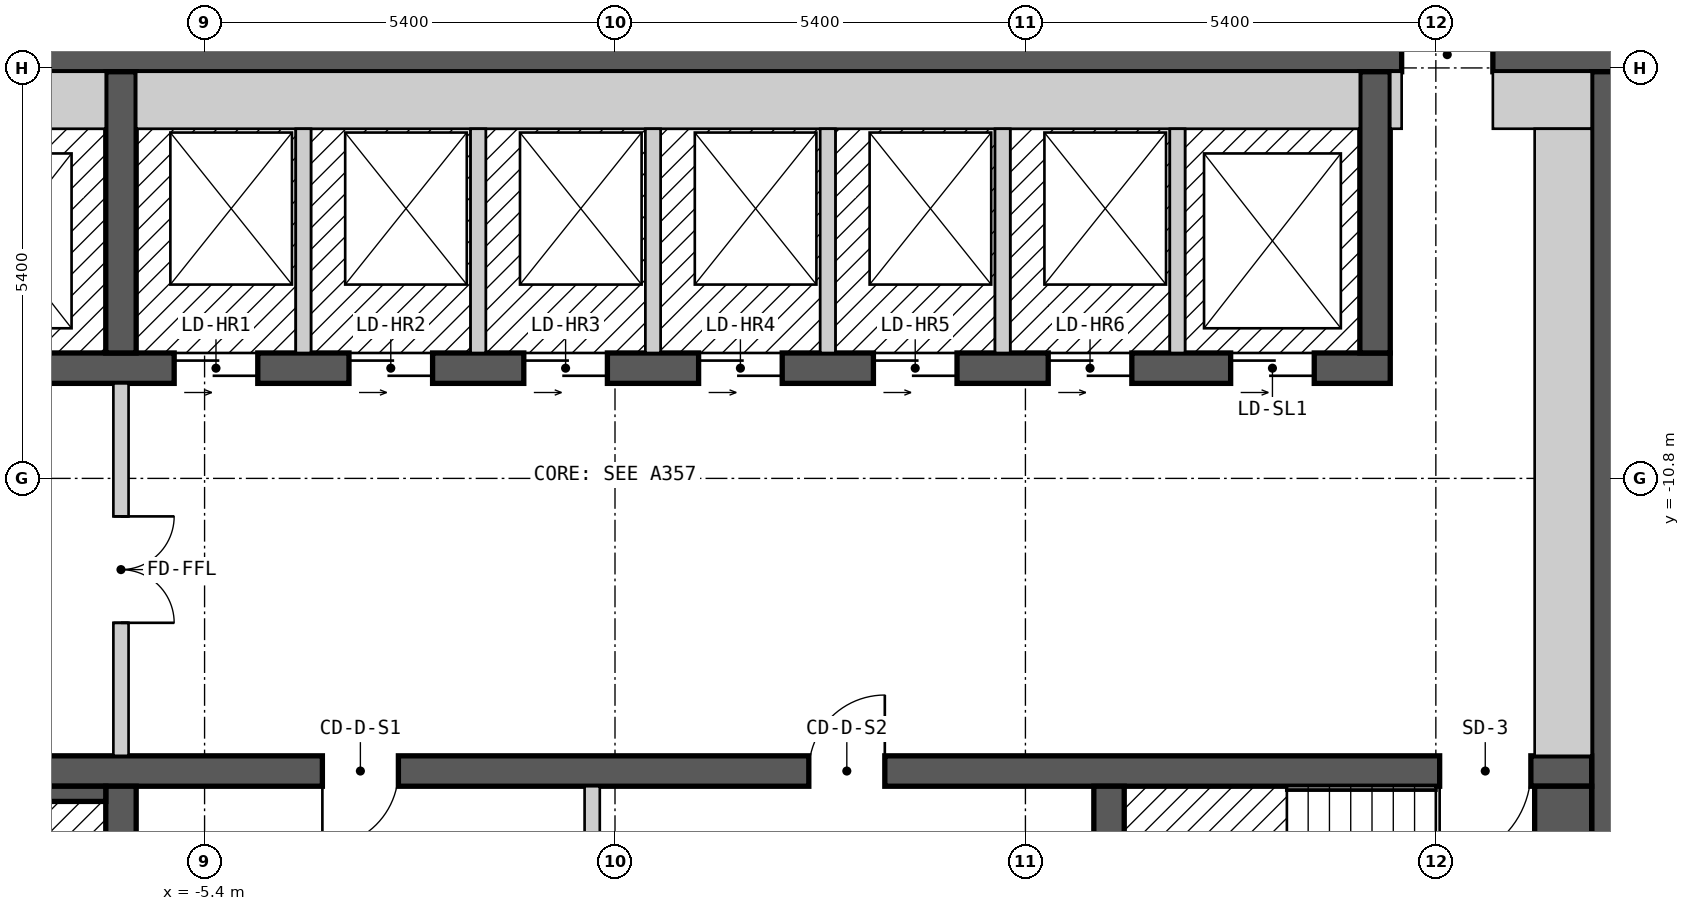
"""IFC4 building model, lengths in metres.
Left out: names, types, materials, properties, quantities, classifications, styles, units other than length and angle.
Written with IfcOpenShell. Run it as: python <this file> out.ifc"""

import sys

from ifc_helpers import new_model, si_unit, direction, frame, frame_2d, origin, place, context, subcontext, project, spatial, rectangle, extrude, element, fill, save


model = new_model("IFC4")
c1 = context("Model", 3, precision=1e-05, world=origin(), true_north=direction((0.0, 1.0)))
c2 = subcontext(c1, "Body", "Model", "MODEL_VIEW")
j1 = project(units=[si_unit("LENGTHUNIT", "METRE"), si_unit("PLANEANGLEUNIT", "RADIAN")], contexts=[c1])
p1 = place(None, origin())
s1 = spatial("IfcSite", under=j1, at=p1, CompositionType="ELEMENT")
p2 = place(p1, origin())
s2 = spatial("IfcBuilding", under=s1, at=p2, CompositionType="ELEMENT")
p3 = place(p2, frame((0.0, 0.0, 208.8)))
s3 = spatial("IfcBuildingStorey", under=s2, at=p3, CompositionType="ELEMENT", Elevation=208.8)
p4 = place(p3, frame((-13.3, -5.225, 0.0), z_axis=(0.0, 0.0, 1.0), x_axis=(1.0, 0.0, 0.0)))
e1 = element("IfcWall", 1, at=p4, inside=s3, PredefinedType="SHEAR", context=c2, shape_type="SweptSolid", body=[
    extrude(rectangle(XDim=26.6, YDim=0.45, at=frame_2d((13.3, 0.0))), origin(), (0.0, 0.0, 1.0), 2.7),
])
p5 = place(p4, frame((23.65, 0.0, 0.0)))
e2 = element("IfcOpeningElement", 2, at=p5, cuts=e1, PredefinedType="OPENING", context=c2, shape_type="SweptSolid", body=[
    extrude(rectangle(XDim=1.2, YDim=2.1, at=frame_2d((0.6, 1.05))), frame((0.0, 0.235, 0.0), z_axis=(0.0, -1.0, 0.0), x_axis=(1.0, 0.0, 0.0)), (0.0, 0.0, 1.0), 0.47),
])
p6 = place(p3, frame((13.075, -18.55, 0.0), z_axis=(0.0, 0.0, 1.0), x_axis=(0.0, 1.0, 0.0)))
e3 = element("IfcWall", 3, at=p6, inside=s3, PredefinedType="SHEAR", context=c2, shape_type="SweptSolid", body=[
    extrude(rectangle(XDim=13.1, YDim=0.45, at=frame_2d((6.55, 0.0))), origin(), (0.0, 0.0, 1.0), 2.7),
])
p7 = place(p3, frame((-12.85, -14.65, 0.0), z_axis=(0.0, 0.0, 1.0), x_axis=(1.0, 0.0, 0.0)))
e4 = element("IfcWall", 4, at=p7, inside=s3, PredefinedType="SHEAR", context=c2, shape_type="SweptSolid", body=[
    extrude(rectangle(XDim=25.7, YDim=0.4, at=frame_2d((12.85, 0.0))), origin(), (0.0, 0.0, 1.0), 2.7),
])
p8 = place(p7, frame((2.05, 0.0, 0.0), z_axis=(0.0, 0.0, 1.0), x_axis=(-1.0, 0.0, 0.0)))
e5 = element("IfcOpeningElement", 5, at=p8, cuts=e4, PredefinedType="OPENING", context=c2, shape_type="SweptSolid", body=[
    extrude(rectangle(XDim=1.2, YDim=2.1, at=frame_2d((0.6, 1.05))), frame((0.0, 0.21, 0.0), z_axis=(0.0, -1.0, 0.0), x_axis=(1.0, 0.0, 0.0)), (0.0, 0.0, 1.0), 0.42),
])
p9 = place(p7, frame((24.9, 0.0, 0.0), z_axis=(0.0, 0.0, 1.0), x_axis=(-1.0, 0.0, 0.0)))
e6 = element("IfcOpeningElement", 6, at=p9, cuts=e4, PredefinedType="OPENING", context=c2, shape_type="SweptSolid", body=[
    extrude(rectangle(XDim=1.2, YDim=2.1, at=frame_2d((0.6, 1.05))), frame((0.0, 0.21, 0.0), z_axis=(0.0, -1.0, 0.0), x_axis=(1.0, 0.0, 0.0)), (0.0, 0.0, 1.0), 0.42),
])
p10 = place(p7, frame((10.0, 0.0, 0.0), z_axis=(0.0, 0.0, 1.0), x_axis=(-1.0, 0.0, 0.0)))
e7 = element("IfcOpeningElement", 7, at=p10, cuts=e4, PredefinedType="OPENING", context=c2, shape_type="SweptSolid", body=[
    extrude(rectangle(XDim=1.0, YDim=2.1, at=frame_2d((0.5, 1.05))), frame((0.0, 0.21, 0.0), z_axis=(0.0, -1.0, 0.0), x_axis=(1.0, 0.0, 0.0)), (0.0, 0.0, 1.0), 0.42),
])
p11 = place(p7, frame((16.4, 0.0, 0.0), z_axis=(0.0, 0.0, 1.0), x_axis=(-1.0, 0.0, 0.0)))
e8 = element("IfcOpeningElement", 8, at=p11, cuts=e4, PredefinedType="OPENING", context=c2, shape_type="SweptSolid", body=[
    extrude(rectangle(XDim=1.0, YDim=2.1, at=frame_2d((0.5, 1.05))), frame((0.0, 0.21, 0.0), z_axis=(0.0, -1.0, 0.0), x_axis=(1.0, 0.0, 0.0)), (0.0, 0.0, 1.0), 0.42),
])
p12 = place(p3, frame((-12.85, -9.35, 0.0), z_axis=(0.0, 0.0, 1.0), x_axis=(1.0, 0.0, 0.0)))
e9 = element("IfcWall", 9, at=p12, inside=s3, PredefinedType="SHEAR", context=c2, shape_type="SweptSolid", body=[
    extrude(rectangle(XDim=23.05, YDim=0.4, at=frame_2d((11.525, 0.0))), origin(), (0.0, 0.0, 1.0), 2.7),
])
p13 = place(p12, frame((1.45, 0.0, 0.0)))
e10 = element("IfcOpeningElement", 10, at=p13, cuts=e9, PredefinedType="OPENING", context=c2, shape_type="SweptSolid", body=[
    extrude(rectangle(XDim=1.1, YDim=2.1, at=frame_2d((0.55, 1.05))), frame((0.0, 0.21, 0.0), z_axis=(0.0, -1.0, 0.0), x_axis=(1.0, 0.0, 0.0)), (0.0, 0.0, 1.0), 0.42),
])
p14 = place(p12, frame((4.25, 0.0, 0.0)))
e11 = element("IfcOpeningElement", 11, at=p14, cuts=e9, PredefinedType="OPENING", context=c2, shape_type="SweptSolid", body=[
    extrude(rectangle(XDim=1.1, YDim=2.1, at=frame_2d((0.55, 1.05))), frame((0.0, 0.21, 0.0), z_axis=(0.0, -1.0, 0.0), x_axis=(1.0, 0.0, 0.0)), (0.0, 0.0, 1.0), 0.42),
])
p15 = place(p12, frame((7.05, 0.0, 0.0)))
e12 = element("IfcOpeningElement", 12, at=p15, cuts=e9, PredefinedType="OPENING", context=c2, shape_type="SweptSolid", body=[
    extrude(rectangle(XDim=1.1, YDim=2.1, at=frame_2d((0.55, 1.05))), frame((0.0, 0.21, 0.0), z_axis=(0.0, -1.0, 0.0), x_axis=(1.0, 0.0, 0.0)), (0.0, 0.0, 1.0), 0.42),
])
p16 = place(p12, frame((9.35, 0.0, 0.0)))
e13 = element("IfcOpeningElement", 13, at=p16, cuts=e9, PredefinedType="OPENING", context=c2, shape_type="SweptSolid", body=[
    extrude(rectangle(XDim=1.1, YDim=2.1, at=frame_2d((0.55, 1.05))), frame((0.0, 0.21, 0.0), z_axis=(0.0, -1.0, 0.0), x_axis=(1.0, 0.0, 0.0)), (0.0, 0.0, 1.0), 0.42),
])
p17 = place(p12, frame((11.65, 0.0, 0.0)))
e14 = element("IfcOpeningElement", 14, at=p17, cuts=e9, PredefinedType="OPENING", context=c2, shape_type="SweptSolid", body=[
    extrude(rectangle(XDim=1.1, YDim=2.1, at=frame_2d((0.55, 1.05))), frame((0.0, 0.21, 0.0), z_axis=(0.0, -1.0, 0.0), x_axis=(1.0, 0.0, 0.0)), (0.0, 0.0, 1.0), 0.42),
])
p18 = place(p12, frame((13.95, 0.0, 0.0)))
e15 = element("IfcOpeningElement", 15, at=p18, cuts=e9, PredefinedType="OPENING", context=c2, shape_type="SweptSolid", body=[
    extrude(rectangle(XDim=1.1, YDim=2.1, at=frame_2d((0.55, 1.05))), frame((0.0, 0.21, 0.0), z_axis=(0.0, -1.0, 0.0), x_axis=(1.0, 0.0, 0.0)), (0.0, 0.0, 1.0), 0.42),
])
p19 = place(p12, frame((16.25, 0.0, 0.0)))
e16 = element("IfcOpeningElement", 16, at=p19, cuts=e9, PredefinedType="OPENING", context=c2, shape_type="SweptSolid", body=[
    extrude(rectangle(XDim=1.1, YDim=2.1, at=frame_2d((0.55, 1.05))), frame((0.0, 0.21, 0.0), z_axis=(0.0, -1.0, 0.0), x_axis=(1.0, 0.0, 0.0)), (0.0, 0.0, 1.0), 0.42),
])
p20 = place(p12, frame((18.55, 0.0, 0.0)))
e17 = element("IfcOpeningElement", 17, at=p20, cuts=e9, PredefinedType="OPENING", context=c2, shape_type="SweptSolid", body=[
    extrude(rectangle(XDim=1.1, YDim=2.1, at=frame_2d((0.55, 1.05))), frame((0.0, 0.21, 0.0), z_axis=(0.0, -1.0, 0.0), x_axis=(1.0, 0.0, 0.0)), (0.0, 0.0, 1.0), 0.42),
])
p21 = place(p12, frame((20.95, 0.0, 0.0)))
e18 = element("IfcOpeningElement", 18, at=p21, cuts=e9, PredefinedType="OPENING", context=c2, shape_type="SweptSolid", body=[
    extrude(rectangle(XDim=1.1, YDim=2.1, at=frame_2d((0.55, 1.05))), frame((0.0, 0.21, 0.0), z_axis=(0.0, -1.0, 0.0), x_axis=(1.0, 0.0, 0.0)), (0.0, 0.0, 1.0), 0.42),
])
for number, where, z_axis, x_axis in (
    (19, (-6.5, -18.55, 0.0), (0.0, 0.0, 1.0), (0.0, 1.0, 0.0)),
    (20, (6.5, -18.55, 0.0), (0.0, 0.0, 1.0), (0.0, 1.0, 0.0)),
    (21, (-6.5, -9.15, 0.0), (0.0, 0.0, 1.0), (0.0, 1.0, 0.0)),
    (22, (10.0, -9.15, 0.0), (0.0, 0.0, 1.0), (0.0, 1.0, 0.0)),
):
    element("IfcWall", number, at=place(p3, frame(where, z_axis=z_axis, x_axis=x_axis)), inside=s3, PredefinedType="SHEAR", context=c2, shape_type="SweptSolid", body=[
        extrude(rectangle(XDim=3.7, YDim=0.4, at=frame_2d((1.85, 0.0))), origin(), (0.0, 0.0, 1.0), 2.7),
    ])
p22 = place(p3, frame((-12.1, -5.825, 0.0), z_axis=(0.0, 0.0, 1.0), x_axis=(1.0, 0.0, 0.0)))
e23 = element("IfcWall", 23, at=p22, inside=s3, PredefinedType="SOLIDWALL", context=c2, shape_type="SweptSolid", body=[
    extrude(rectangle(XDim=5.4, YDim=0.75, at=frame_2d((2.7, 0.0))), origin(), (0.0, 0.0, 1.0), 2.7),
])
p23 = place(p3, frame((-10.8, -14.95, 0.0), z_axis=(0.0, 0.0, 1.0), x_axis=(1.0, 0.0, 0.0)))
e24 = element("IfcWall", 24, at=p23, inside=s3, PredefinedType="SOLIDWALL", context=c2, shape_type="SweptSolid", body=[
    extrude(rectangle(XDim=4.1, YDim=0.2, at=frame_2d((2.05, 0.0))), origin(), (0.0, 0.0, 1.0), 2.7),
])
p24 = place(p3, frame((-6.5, -14.45, 0.0), z_axis=(0.0, 0.0, 1.0), x_axis=(0.0, 1.0, 0.0)))
e25 = element("IfcWall", 25, at=p24, inside=s3, PredefinedType="PARTITIONING", context=c2, shape_type="SweptSolid", body=[
    extrude(rectangle(XDim=4.9, YDim=0.2, at=frame_2d((2.45, 0.0))), origin(), (0.0, 0.0, 1.0), 2.7),
])
p25 = place(p24, frame((3.15, 0.0, 0.0), z_axis=(0.0, 0.0, 1.0), x_axis=(-1.0, 0.0, 0.0)))
e26 = element("IfcOpeningElement", 26, at=p25, cuts=e25, PredefinedType="OPENING", context=c2, shape_type="SweptSolid", body=[
    extrude(rectangle(XDim=1.4, YDim=2.1, at=frame_2d((0.7, 1.05))), frame((0.0, 0.11, 0.0), z_axis=(0.0, -1.0, 0.0), x_axis=(1.0, 0.0, 0.0)), (0.0, 0.0, 1.0), 0.22),
])
p26 = place(p3, frame((-6.3, -5.825, 0.0), z_axis=(0.0, 0.0, 1.0), x_axis=(1.0, 0.0, 0.0)))
e27 = element("IfcWall", 27, at=p26, inside=s3, PredefinedType="SOLIDWALL", context=c2, shape_type="SweptSolid", body=[
    extrude(rectangle(XDim=16.1, YDim=0.75, at=frame_2d((8.05, 0.0))), origin(), (0.0, 0.0, 1.0), 2.7),
])
for number, where, z_axis, x_axis in (
    (28, (-4.1, -9.15, 0.0), (0.0, 0.0, 1.0), (0.0, 1.0, 0.0)),
    (29, (-1.8, -9.15, 0.0), (0.0, 0.0, 1.0), (0.0, 1.0, 0.0)),
):
    element("IfcWall", number, at=place(p3, frame(where, z_axis=z_axis, x_axis=x_axis)), inside=s3, PredefinedType="SOLIDWALL", context=c2, shape_type="SweptSolid", body=[
        extrude(rectangle(XDim=2.95, YDim=0.2, at=frame_2d((1.475, 0.0))), origin(), (0.0, 0.0, 1.0), 2.7),
    ])
p27 = place(p3, frame((-0.3, -17.8, 0.0), z_axis=(0.0, 0.0, 1.0), x_axis=(0.0, 1.0, 0.0)))
e30 = element("IfcWall", 30, at=p27, inside=s3, PredefinedType="PARTITIONING", context=c2, shape_type="SweptSolid", body=[
    extrude(rectangle(XDim=2.95, YDim=0.2, at=frame_2d((1.475, 0.0))), origin(), (0.0, 0.0, 1.0), 2.7),
])
for number, where, z_axis, x_axis in (
    (31, (0.5, -9.15, 0.0), (0.0, 0.0, 1.0), (0.0, 1.0, 0.0)),
    (32, (2.8, -9.15, 0.0), (0.0, 0.0, 1.0), (0.0, 1.0, 0.0)),
    (33, (5.1, -9.15, 0.0), (0.0, 0.0, 1.0), (0.0, 1.0, 0.0)),
    (34, (7.4, -9.15, 0.0), (0.0, 0.0, 1.0), (0.0, 1.0, 0.0)),
):
    element("IfcWall", number, at=place(p3, frame(where, z_axis=z_axis, x_axis=x_axis)), inside=s3, PredefinedType="SOLIDWALL", context=c2, shape_type="SweptSolid", body=[
        extrude(rectangle(XDim=2.95, YDim=0.2, at=frame_2d((1.475, 0.0))), origin(), (0.0, 0.0, 1.0), 2.7),
    ])
p28 = place(p3, frame((10.275, -6.2, 0.0), z_axis=(0.0, 0.0, 1.0), x_axis=(0.0, 1.0, 0.0)))
e35 = element("IfcWall", 35, at=p28, inside=s3, PredefinedType="PARTITIONING", context=c2, shape_type="SweptSolid", body=[
    extrude(rectangle(XDim=0.75, YDim=0.15, at=frame_2d((0.375, 0.0))), origin(), (0.0, 0.0, 1.0), 2.7),
])
p29 = place(p3, frame((11.55, -5.825, 0.0), z_axis=(0.0, 0.0, 1.0), x_axis=(1.0, 0.0, 0.0)))
e36 = element("IfcWall", 36, at=p29, inside=s3, PredefinedType="PARTITIONING", context=c2, shape_type="SweptSolid", body=[
    extrude(rectangle(XDim=1.3, YDim=0.75, at=frame_2d((0.65, 0.0))), origin(), (0.0, 0.0, 1.0), 2.7),
])
p30 = place(p3, frame((12.475, -17.6, 0.0), z_axis=(0.0, 0.0, 1.0), x_axis=(0.0, 1.0, 0.0)))
e37 = element("IfcWall", 37, at=p30, inside=s3, PredefinedType="SOLIDWALL", context=c2, shape_type="SweptSolid", body=[
    extrude(rectangle(XDim=2.75, YDim=0.75, at=frame_2d((1.375, 0.0))), origin(), (0.0, 0.0, 1.0), 2.7),
])
p31 = place(p3, frame((12.475, -14.45, 0.0), z_axis=(0.0, 0.0, 1.0), x_axis=(0.0, 1.0, 0.0)))
e38 = element("IfcWall", 38, at=p31, inside=s3, PredefinedType="PARTITIONING", context=c2, shape_type="SweptSolid", body=[
    extrude(rectangle(XDim=8.25, YDim=0.75, at=frame_2d((4.125, 0.0))), origin(), (0.0, 0.0, 1.0), 2.7),
])
p32 = place(p15, origin())
e39 = element("IfcDoor", 39, at=p32, inside=s3, OperationType="DOUBLE_DOOR_SLIDING", PredefinedType="DOOR", context=c2, shape_type="SweptSolid", body=[
    extrude(rectangle(XDim=1.1, YDim=2.1, at=frame_2d((0.55, 1.05))), frame((0.0, 0.025, 0.0), z_axis=(0.0, -1.0, 0.0), x_axis=(1.0, 0.0, 0.0)), (0.0, 0.0, 1.0), 0.05),
])
fill(e12, e39)
p33 = place(p16, origin())
e40 = element("IfcDoor", 40, at=p33, inside=s3, OperationType="DOUBLE_DOOR_SLIDING", PredefinedType="DOOR", context=c2, shape_type="SweptSolid", body=[
    extrude(rectangle(XDim=1.1, YDim=2.1, at=frame_2d((0.55, 1.05))), frame((0.0, 0.025, 0.0), z_axis=(0.0, -1.0, 0.0), x_axis=(1.0, 0.0, 0.0)), (0.0, 0.0, 1.0), 0.05),
])
fill(e13, e40)
p34 = place(p17, origin())
e41 = element("IfcDoor", 41, at=p34, inside=s3, OperationType="DOUBLE_DOOR_SLIDING", PredefinedType="DOOR", context=c2, shape_type="SweptSolid", body=[
    extrude(rectangle(XDim=1.1, YDim=2.1, at=frame_2d((0.55, 1.05))), frame((0.0, 0.025, 0.0), z_axis=(0.0, -1.0, 0.0), x_axis=(1.0, 0.0, 0.0)), (0.0, 0.0, 1.0), 0.05),
])
fill(e14, e41)
p35 = place(p18, origin())
e42 = element("IfcDoor", 42, at=p35, inside=s3, OperationType="DOUBLE_DOOR_SLIDING", PredefinedType="DOOR", context=c2, shape_type="SweptSolid", body=[
    extrude(rectangle(XDim=1.1, YDim=2.1, at=frame_2d((0.55, 1.05))), frame((0.0, 0.025, 0.0), z_axis=(0.0, -1.0, 0.0), x_axis=(1.0, 0.0, 0.0)), (0.0, 0.0, 1.0), 0.05),
])
fill(e15, e42)
p36 = place(p19, origin())
e43 = element("IfcDoor", 43, at=p36, inside=s3, OperationType="DOUBLE_DOOR_SLIDING", PredefinedType="DOOR", context=c2, shape_type="SweptSolid", body=[
    extrude(rectangle(XDim=1.1, YDim=2.1, at=frame_2d((0.55, 1.05))), frame((0.0, 0.025, 0.0), z_axis=(0.0, -1.0, 0.0), x_axis=(1.0, 0.0, 0.0)), (0.0, 0.0, 1.0), 0.05),
])
fill(e16, e43)
p37 = place(p20, origin())
e44 = element("IfcDoor", 44, at=p37, inside=s3, OperationType="DOUBLE_DOOR_SLIDING", PredefinedType="DOOR", context=c2, shape_type="SweptSolid", body=[
    extrude(rectangle(XDim=1.1, YDim=2.1, at=frame_2d((0.55, 1.05))), frame((0.0, 0.025, 0.0), z_axis=(0.0, -1.0, 0.0), x_axis=(1.0, 0.0, 0.0)), (0.0, 0.0, 1.0), 0.05),
])
fill(e17, e44)
p38 = place(p21, origin())
e45 = element("IfcDoor", 45, at=p38, inside=s3, OperationType="DOUBLE_DOOR_SLIDING", PredefinedType="DOOR", context=c2, shape_type="SweptSolid", body=[
    extrude(rectangle(XDim=1.1, YDim=2.1, at=frame_2d((0.55, 1.05))), frame((0.0, 0.025, 0.0), z_axis=(0.0, -1.0, 0.0), x_axis=(1.0, 0.0, 0.0)), (0.0, 0.0, 1.0), 0.05),
])
fill(e18, e45)
p39 = place(p9, origin())
e46 = element("IfcDoor", 46, at=p39, inside=s3, OperationType="SINGLE_SWING_RIGHT", PredefinedType="DOOR", context=c2, shape_type="SweptSolid", body=[
    extrude(rectangle(XDim=1.2, YDim=2.1, at=frame_2d((0.6, 1.05))), frame((0.0, 0.025, 0.0), z_axis=(0.0, -1.0, 0.0), x_axis=(1.0, 0.0, 0.0)), (0.0, 0.0, 1.0), 0.05),
])
fill(e6, e46)
p40 = place(p25, origin())
e47 = element("IfcDoor", 47, at=p40, inside=s3, OperationType="DOUBLE_DOOR_SINGLE_SWING", PredefinedType="DOOR", context=c2, shape_type="SweptSolid", body=[
    extrude(rectangle(XDim=1.4, YDim=2.1, at=frame_2d((0.7, 1.05))), frame((0.0, 0.025, 0.0), z_axis=(0.0, -1.0, 0.0), x_axis=(1.0, 0.0, 0.0)), (0.0, 0.0, 1.0), 0.05),
])
fill(e26, e47)
p41 = place(p5, origin())
e48 = element("IfcDoor", 48, at=p41, inside=s3, OperationType="DOUBLE_DOOR_SINGLE_SWING", PredefinedType="DOOR", context=c2, shape_type="SweptSolid", body=[
    extrude(rectangle(XDim=1.2, YDim=2.1, at=frame_2d((0.6, 1.05))), frame((0.0, 0.025, 0.0), z_axis=(0.0, -1.0, 0.0), x_axis=(1.0, 0.0, 0.0)), (0.0, 0.0, 1.0), 0.05),
])
fill(e2, e48)
p42 = place(p10, origin())
e49 = element("IfcDoor", 49, at=p42, inside=s3, OperationType="SINGLE_SWING_RIGHT", PredefinedType="DOOR", context=c2, shape_type="SweptSolid", body=[
    extrude(rectangle(XDim=1.0, YDim=2.1, at=frame_2d((0.5, 1.05))), frame((0.0, 0.025, 0.0), z_axis=(0.0, -1.0, 0.0), x_axis=(1.0, 0.0, 0.0)), (0.0, 0.0, 1.0), 0.05),
])
fill(e7, e49)
p43 = place(p11, origin())
e50 = element("IfcDoor", 50, at=p43, inside=s3, OperationType="SINGLE_SWING_LEFT", PredefinedType="DOOR", context=c2, shape_type="SweptSolid", body=[
    extrude(rectangle(XDim=1.0, YDim=2.1, at=frame_2d((0.5, 1.05))), frame((0.0, 0.025, 0.0), z_axis=(0.0, -1.0, 0.0), x_axis=(1.0, 0.0, 0.0)), (0.0, 0.0, 1.0), 0.05),
])
fill(e8, e50)
save(model, sys.argv[1])
